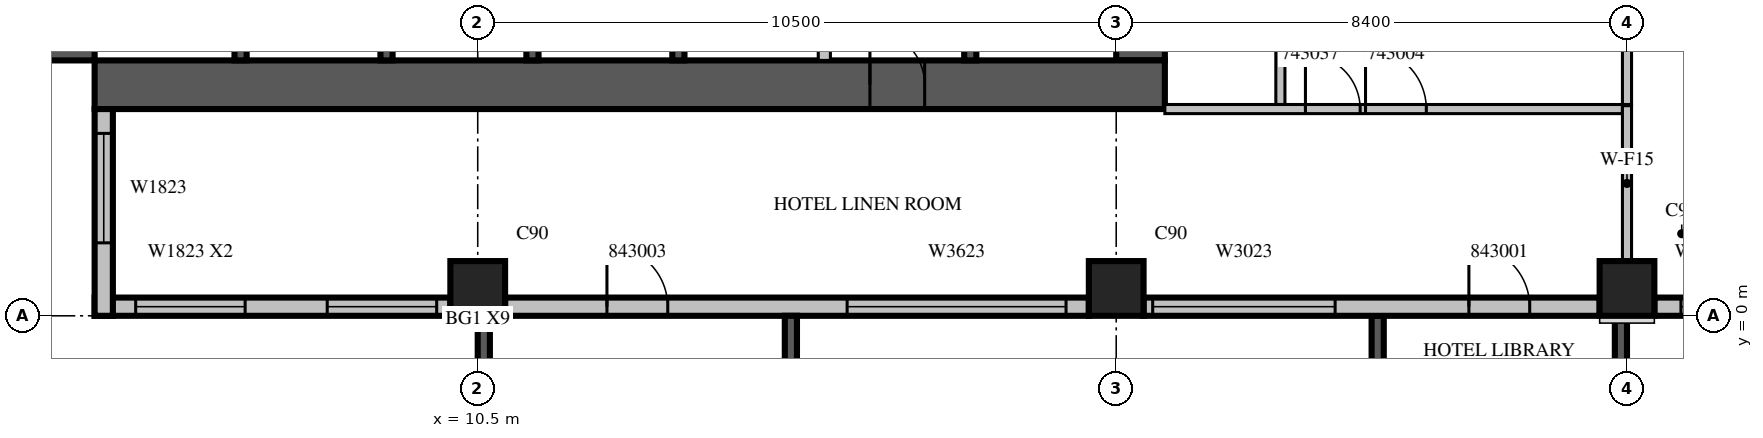
"""IFC4 building model, lengths in metres.
Left out: names, types, materials, properties, quantities, classifications, styles, units other than length and angle.
Written with IfcOpenShell. Run it as: python <this file> out.ifc"""

import sys

from ifc_helpers import new_model, si_unit, direction, frame, frame_2d, origin, origin_2d, place, context, subcontext, project, spatial, rectangle, extrude, source, transform, mapped, element, fill, save


model = new_model("IFC4")
c1 = context("Model", 3, precision=1e-05, world=origin(), true_north=direction((0.0, 1.0)))
c2 = subcontext(c1, "Body", "Model", "MODEL_VIEW")
j1 = project(units=[si_unit("LENGTHUNIT", "METRE"), si_unit("PLANEANGLEUNIT", "RADIAN")], contexts=[c1])
p1 = place(None, origin())
s1 = spatial("IfcSite", under=j1, at=p1, CompositionType="ELEMENT")
p2 = place(p1, origin())
s2 = spatial("IfcBuilding", under=s1, at=p2, CompositionType="ELEMENT")
p3 = place(p2, frame((0.0, 0.0, 196.8)))
s3 = spatial("IfcBuildingStorey", under=s2, at=p3, CompositionType="ELEMENT", Elevation=196.8)
m1 = source(origin(), c2, "Body", "SweptSolid", [
    extrude(rectangle(XDim=0.9, YDim=0.9, at=origin_2d()), origin(), (0.0, 0.0, 1.0), 3.8),
])
for number, where, z_axis, x_axis in (
    (1, (10.5, 0.45, 0.0), (0.0, 0.0, 1.0), (1.0, 0.0, 0.0)),
    (2, (21.0, 0.45, 0.0), (0.0, 0.0, 1.0), (1.0, 0.0, 0.0)),
    (3, (29.4, 0.45, 0.0), (0.0, 0.0, 1.0), (1.0, 0.0, 0.0)),
):
    element("IfcColumn", number, at=place(p3, frame(where, z_axis=z_axis, x_axis=x_axis)), inside=s3, PredefinedType="COLUMN", context=c2, shape_type="MappedRepresentation", body=[
        mapped(m1, transform((0.0, 0.0, 0.0), scale=1.0)),
    ])
m2 = source(origin(), c2, "Body", "SweptSolid", [
    extrude(rectangle(XDim=17.6, YDim=0.8, at=frame_2d((8.8, 0.0))), origin(), (0.0, 0.0, 1.0), 3.8),
])
p4 = place(p3, frame((3.8, 4.2, 0.0), z_axis=(0.0, 0.0, 1.0), x_axis=(0.0, 1.0, 0.0)))
e4 = element("IfcWall", 4, at=p4, inside=s3, PredefinedType="SHEAR", context=c2, shape_type="MappedRepresentation", body=[
    mapped(m2, transform((0.0, 0.0, 0.0), scale=1.0)),
])
m3 = source(origin(), c2, "Body", "SweptSolid", [
    extrude(rectangle(XDim=2.2, YDim=2.1, at=frame_2d((1.1, 1.05))), frame((0.0, 0.41, 0.0), z_axis=(0.0, -1.0, 0.0), x_axis=(1.0, 0.0, 0.0)), (0.0, 0.0, 1.0), 0.82),
])
p5 = place(p4, frame((4.2, 0.0, 0.0)))
e5 = element("IfcOpeningElement", 5, at=p5, cuts=e4, PredefinedType="OPENING", context=c2, shape_type="MappedRepresentation", body=[
    mapped(m3, transform((0.0, 0.0, 0.0), scale=1.0)),
])
m4 = source(origin(), c2, "Body", "SweptSolid", [
    extrude(rectangle(XDim=0.9, YDim=2.1, at=frame_2d((0.45, 1.05))), frame((0.0, 0.41, 0.0), z_axis=(0.0, -1.0, 0.0), x_axis=(1.0, 0.0, 0.0)), (0.0, 0.0, 1.0), 0.82),
])
p6 = place(p4, frame((10.95, 0.0, 0.0)))
e6 = element("IfcOpeningElement", 6, at=p6, cuts=e4, PredefinedType="OPENING", context=c2, shape_type="MappedRepresentation", body=[
    mapped(m4, transform((0.0, 0.0, 0.0), scale=1.0)),
])
m5 = source(origin(), c2, "Body", "SweptSolid", [
    extrude(rectangle(XDim=16.8, YDim=0.8, at=frame_2d((8.4, 0.0))), origin(), (0.0, 0.0, 1.0), 3.8),
])
p7 = place(p3, frame((21.4, 4.2, 0.0), z_axis=(0.0, 0.0, 1.0), x_axis=(0.0, 1.0, 0.0)))
e7 = element("IfcWall", 7, at=p7, inside=s3, PredefinedType="SHEAR", context=c2, shape_type="MappedRepresentation", body=[
    mapped(m5, transform((0.0, 0.0, 0.0), scale=1.0)),
])
p8 = place(p7, frame((4.2, 0.0, 0.0)))
e8 = element("IfcOpeningElement", 8, at=p8, cuts=e7, PredefinedType="OPENING", context=c2, shape_type="MappedRepresentation", body=[
    mapped(m3, transform((0.0, 0.0, 0.0), scale=1.0)),
])
m6 = source(origin(), c2, "Body", "SweptSolid", [
    extrude(rectangle(XDim=1.2, YDim=2.1, at=frame_2d((0.6, 1.05))), frame((0.0, 0.41, 0.0), z_axis=(0.0, -1.0, 0.0), x_axis=(1.0, 0.0, 0.0)), (0.0, 0.0, 1.0), 0.82),
])
p9 = place(p7, frame((14.7, 0.0, 0.0)))
e9 = element("IfcOpeningElement", 9, at=p9, cuts=e7, PredefinedType="OPENING", context=c2, shape_type="MappedRepresentation", body=[
    mapped(m6, transform((0.0, 0.0, 0.0), scale=1.0)),
])
p10 = place(p3, frame((4.2, 3.8, 0.0), z_axis=(0.0, 0.0, 1.0), x_axis=(1.0, 0.0, 0.0)))
e10 = element("IfcWall", 10, at=p10, inside=s3, PredefinedType="SHEAR", context=c2, shape_type="MappedRepresentation", body=[
    mapped(m2, transform((0.0, 0.0, 0.0), scale=1.0)),
])
p11 = place(p10, frame((12.75, 0.0, 0.0)))
e11 = element("IfcOpeningElement", 11, at=p11, cuts=e10, PredefinedType="OPENING", context=c2, shape_type="MappedRepresentation", body=[
    mapped(m4, transform((0.0, 0.0, 0.0), scale=1.0)),
])
m7 = source(origin(), c2, "Body", "SweptSolid", [
    extrude(rectangle(XDim=3.9, YDim=0.2, at=frame_2d((1.95, 0.0))), origin(), (0.0, 0.0, 1.0), 3.4),
])
p12 = place(p3, frame((25.3, 0.0, 0.0), z_axis=(0.0, 0.0, 1.0), x_axis=(0.0, -1.0, 0.0)))
e12 = element("IfcWall", 12, at=p12, inside=s3, PredefinedType="SOLIDWALL", context=c2, shape_type="MappedRepresentation", body=[
    mapped(m7, transform((0.0, 0.0, 0.0), scale=1.0)),
])
m8 = source(origin(), c2, "Body", "SweptSolid", [
    extrude(rectangle(XDim=2.4, YDim=2.3, at=frame_2d((1.2, 1.15))), frame((0.0, 0.11, 0.0), z_axis=(0.0, -1.0, 0.0), x_axis=(1.0, 0.0, 0.0)), (0.0, 0.0, 1.0), 0.22),
])
p13 = place(p12, frame((0.75, 0.0, 0.6)))
e13 = element("IfcOpeningElement", 13, at=p13, cuts=e12, PredefinedType="OPENING", context=c2, shape_type="MappedRepresentation", body=[
    mapped(m8, transform((0.0, 0.0, 0.0), scale=1.0)),
])
p14 = place(p3, frame((29.3, 0.0, 0.0), z_axis=(0.0, 0.0, 1.0), x_axis=(0.0, -1.0, 0.0)))
e14 = element("IfcWall", 14, at=p14, inside=s3, PredefinedType="SOLIDWALL", context=c2, shape_type="MappedRepresentation", body=[
    mapped(m7, transform((0.0, 0.0, 0.0), scale=1.0)),
])
p15 = place(p14, frame((0.75, 0.0, 0.6)))
e15 = element("IfcOpeningElement", 15, at=p15, cuts=e14, PredefinedType="OPENING", context=c2, shape_type="MappedRepresentation", body=[
    mapped(m8, transform((0.0, 0.0, 0.0), scale=1.0)),
])
m9 = source(origin(), c2, "Body", "SweptSolid", [
    extrude(rectangle(XDim=5.85, YDim=0.3, at=frame_2d((2.925, 0.0))), origin(), (0.0, 0.0, 1.0), 3.4),
])
p16 = place(p3, frame((4.2, 0.15, 0.0), z_axis=(0.0, 0.0, 1.0), x_axis=(1.0, 0.0, 0.0)))
e16 = element("IfcWall", 16, at=p16, inside=s3, PredefinedType="STANDARD", context=c2, shape_type="MappedRepresentation", body=[
    mapped(m9, transform((0.0, 0.0, 0.0), scale=1.0)),
])
m10 = source(origin(), c2, "Body", "SweptSolid", [
    extrude(rectangle(XDim=1.8, YDim=2.3, at=frame_2d((0.9, 1.15))), frame((0.0, 0.16, 0.0), z_axis=(0.0, -1.0, 0.0), x_axis=(1.0, 0.0, 0.0)), (0.0, 0.0, 1.0), 0.32),
])
p17 = place(p16, frame((0.675, 0.0, 0.6)))
e17 = element("IfcOpeningElement", 17, at=p17, cuts=e16, PredefinedType="OPENING", context=c2, shape_type="MappedRepresentation", body=[
    mapped(m10, transform((0.0, 0.0, 0.0), scale=1.0)),
])
p18 = place(p16, frame((3.825, 0.0, 0.6)))
e18 = element("IfcOpeningElement", 18, at=p18, cuts=e16, PredefinedType="OPENING", context=c2, shape_type="MappedRepresentation", body=[
    mapped(m10, transform((0.0, 0.0, 0.0), scale=1.0)),
])
m11 = source(origin(), c2, "Body", "SweptSolid", [
    extrude(rectangle(XDim=9.6, YDim=0.3, at=frame_2d((4.8, 0.0))), origin(), (0.0, 0.0, 1.0), 3.4),
])
p19 = place(p3, frame((10.95, 0.15, 0.0), z_axis=(0.0, 0.0, 1.0), x_axis=(1.0, 0.0, 0.0)))
e19 = element("IfcWall", 19, at=p19, inside=s3, PredefinedType="STANDARD", context=c2, shape_type="MappedRepresentation", body=[
    mapped(m11, transform((0.0, 0.0, 0.0), scale=1.0)),
])
m12 = source(origin(), c2, "Body", "SweptSolid", [
    extrude(rectangle(XDim=3.6, YDim=2.3, at=frame_2d((1.8, 1.15))), frame((0.0, 0.16, 0.0), z_axis=(0.0, -1.0, 0.0), x_axis=(1.0, 0.0, 0.0)), (0.0, 0.0, 1.0), 0.32),
])
p20 = place(p19, frame((5.625, 0.0, 0.6)))
e20 = element("IfcOpeningElement", 20, at=p20, cuts=e19, PredefinedType="OPENING", context=c2, shape_type="MappedRepresentation", body=[
    mapped(m12, transform((0.0, 0.0, 0.0), scale=1.0)),
])
m13 = source(origin(), c2, "Body", "SweptSolid", [
    extrude(rectangle(XDim=1.0, YDim=2.1, at=frame_2d((0.5, 1.05))), frame((0.0, 0.16, 0.0), z_axis=(0.0, -1.0, 0.0), x_axis=(1.0, 0.0, 0.0)), (0.0, 0.0, 1.0), 0.32),
])
p21 = place(p19, frame((1.675, 0.0, 0.0)))
e21 = element("IfcOpeningElement", 21, at=p21, cuts=e19, PredefinedType="OPENING", context=c2, shape_type="MappedRepresentation", body=[
    mapped(m13, transform((0.0, 0.0, 0.0), scale=1.0)),
])
m14 = source(origin(), c2, "Body", "SweptSolid", [
    extrude(rectangle(XDim=7.5, YDim=0.3, at=frame_2d((3.75, 0.0))), origin(), (0.0, 0.0, 1.0), 3.4),
])
p22 = place(p3, frame((21.45, 0.15, 0.0), z_axis=(0.0, 0.0, 1.0), x_axis=(1.0, 0.0, 0.0)))
e22 = element("IfcWall", 22, at=p22, inside=s3, PredefinedType="STANDARD", context=c2, shape_type="MappedRepresentation", body=[
    mapped(m14, transform((0.0, 0.0, 0.0), scale=1.0)),
])
m15 = source(origin(), c2, "Body", "SweptSolid", [
    extrude(rectangle(XDim=3.0, YDim=2.3, at=frame_2d((1.5, 1.15))), frame((0.0, 0.16, 0.0), z_axis=(0.0, -1.0, 0.0), x_axis=(1.0, 0.0, 0.0)), (0.0, 0.0, 1.0), 0.32),
])
p23 = place(p22, frame((0.15, 0.0, 0.6)))
e23 = element("IfcOpeningElement", 23, at=p23, cuts=e22, PredefinedType="OPENING", context=c2, shape_type="MappedRepresentation", body=[
    mapped(m15, transform((0.0, 0.0, 0.0), scale=1.0)),
])
p24 = place(p22, frame((5.35, 0.0, 0.0)))
e24 = element("IfcOpeningElement", 24, at=p24, cuts=e22, PredefinedType="OPENING", context=c2, shape_type="MappedRepresentation", body=[
    mapped(m13, transform((0.0, 0.0, 0.0), scale=1.0)),
])
p25 = place(p3, frame((29.85, 0.15, 0.0), z_axis=(0.0, 0.0, 1.0), x_axis=(1.0, 0.0, 0.0)))
e25 = element("IfcWall", 25, at=p25, inside=s3, PredefinedType="STANDARD", context=c2, shape_type="MappedRepresentation", body=[
    mapped(m14, transform((0.0, 0.0, 0.0), scale=1.0)),
])
m16 = source(origin(), c2, "Body", "SweptSolid", [
    extrude(rectangle(XDim=1.2, YDim=2.3, at=frame_2d((0.6, 1.15))), frame((0.0, 0.16, 0.0), z_axis=(0.0, -1.0, 0.0), x_axis=(1.0, 0.0, 0.0)), (0.0, 0.0, 1.0), 0.32),
])
p26 = place(p25, frame((0.438, 0.0, 0.6)))
e26 = element("IfcOpeningElement", 26, at=p26, cuts=e25, PredefinedType="OPENING", context=c2, shape_type="MappedRepresentation", body=[
    mapped(m16, transform((0.0, 0.0, 0.0), scale=1.0)),
])
p27 = place(p25, frame((5.963, 0.0, 0.6)))
e27 = element("IfcOpeningElement", 27, at=p27, cuts=e25, PredefinedType="OPENING", context=c2, shape_type="MappedRepresentation", body=[
    mapped(m16, transform((0.0, 0.0, 0.0), scale=1.0)),
])
m17 = source(origin(), c2, "Body", "SweptSolid", [
    extrude(rectangle(XDim=2.4, YDim=2.3, at=frame_2d((1.2, 1.15))), frame((0.0, 0.16, 0.0), z_axis=(0.0, -1.0, 0.0), x_axis=(1.0, 0.0, 0.0)), (0.0, 0.0, 1.0), 0.32),
])
p28 = place(p25, frame((2.6, 0.0, 0.6)))
e28 = element("IfcOpeningElement", 28, at=p28, cuts=e25, PredefinedType="OPENING", context=c2, shape_type="MappedRepresentation", body=[
    mapped(m17, transform((0.0, 0.0, 0.0), scale=1.0)),
])
m18 = source(origin(), c2, "Body", "SweptSolid", [
    extrude(rectangle(XDim=3.4, YDim=0.3, at=frame_2d((1.7, 0.0))), origin(), (0.0, 0.0, 1.0), 3.4),
])
p29 = place(p3, frame((4.35, 3.4, 0.0), z_axis=(0.0, 0.0, 1.0), x_axis=(0.0, -1.0, 0.0)))
e29 = element("IfcWall", 29, at=p29, inside=s3, PredefinedType="STANDARD", context=c2, shape_type="MappedRepresentation", body=[
    mapped(m18, transform((0.0, 0.0, 0.0), scale=1.0)),
])
p30 = place(p29, frame((0.4, 0.0, 0.6)))
e30 = element("IfcOpeningElement", 30, at=p30, cuts=e29, PredefinedType="OPENING", context=c2, shape_type="MappedRepresentation", body=[
    mapped(m10, transform((0.0, 0.0, 0.0), scale=1.0)),
])
m19 = source(origin(), c2, "Body", "SweptSolid", [
    extrude(rectangle(XDim=3.9, YDim=0.2, at=frame_2d((1.95, 0.0))), origin(), (0.0, 0.0, 1.0), 3.39),
])
p31 = place(p3, frame((10.6, 0.0, 0.0), z_axis=(0.0, 0.0, 1.0), x_axis=(0.0, -1.0, 0.0)))
e31 = element("IfcWall", 31, at=p31, inside=s3, PredefinedType="SOLIDWALL", context=c2, shape_type="MappedRepresentation", body=[
    mapped(m19, transform((0.0, 0.0, 0.0), scale=1.0)),
])
p32 = place(p31, frame((0.75, 0.0, 0.6)))
e32 = element("IfcOpeningElement", 32, at=p32, cuts=e31, PredefinedType="OPENING", context=c2, shape_type="MappedRepresentation", body=[
    mapped(m8, transform((0.0, 0.0, 0.0), scale=1.0)),
])
p33 = place(p3, frame((15.65, 0.0, 0.0), z_axis=(0.0, 0.0, 1.0), x_axis=(0.0, -1.0, 0.0)))
e33 = element("IfcWall", 33, at=p33, inside=s3, PredefinedType="SOLIDWALL", context=c2, shape_type="MappedRepresentation", body=[
    mapped(m19, transform((0.0, 0.0, 0.0), scale=1.0)),
])
p34 = place(p33, frame((0.75, 0.0, 0.6)))
e34 = element("IfcOpeningElement", 34, at=p34, cuts=e33, PredefinedType="OPENING", context=c2, shape_type="MappedRepresentation", body=[
    mapped(m8, transform((0.0, 0.0, 0.0), scale=1.0)),
])
m20 = source(origin(), c2, "Body", "SweptSolid", [
    extrude(rectangle(XDim=3.1, YDim=0.2, at=frame_2d((1.55, 0.0))), origin(), (0.0, 0.0, 1.0), 3.8),
])
for number, where, z_axis, x_axis in (
    (35, (6.6, 4.2, 0.0), (0.0, 0.0, 1.0), (0.0, 1.0, 0.0)),
    (36, (9.0, 4.2, 0.0), (0.0, 0.0, 1.0), (0.0, 1.0, 0.0)),
    (37, (11.4, 4.2, 0.0), (0.0, 0.0, 1.0), (0.0, 1.0, 0.0)),
):
    element("IfcWall", number, at=place(p3, frame(where, z_axis=z_axis, x_axis=x_axis)), inside=s3, PredefinedType="SOLIDWALL", context=c2, shape_type="MappedRepresentation", body=[
        mapped(m20, transform((0.0, 0.0, 0.0), scale=1.0)),
    ])
m21 = source(origin(), c2, "Body", "SweptSolid", [
    extrude(rectangle(XDim=3.1, YDim=0.2, at=frame_2d((1.55, 0.0))), origin(), (0.0, 0.0, 1.0), 3.4),
])
for number, where, z_axis, x_axis in (
    (38, (13.8, 4.2, 0.0), (0.0, 0.0, 1.0), (0.0, 1.0, 0.0)),
    (39, (18.6, 4.2, 0.0), (0.0, 0.0, 1.0), (0.0, 1.0, 0.0)),
):
    element("IfcWall", number, at=place(p3, frame(where, z_axis=z_axis, x_axis=x_axis)), inside=s3, PredefinedType="SOLIDWALL", context=c2, shape_type="MappedRepresentation", body=[
        mapped(m21, transform((0.0, 0.0, 0.0), scale=1.0)),
    ])
m22 = source(origin(), c2, "Body", "SweptSolid", [
    extrude(rectangle(XDim=3.1, YDim=0.2, at=frame_2d((1.55, 0.0))), origin(), (0.0, 0.0, 1.0), 3.4),
])
p35 = place(p3, frame((16.2, 4.2, 0.0), z_axis=(0.0, 0.0, 1.0), x_axis=(0.0, 1.0, 0.0)))
e40 = element("IfcWall", 40, at=p35, inside=s3, PredefinedType="PARTITIONING", context=c2, shape_type="MappedRepresentation", body=[
    mapped(m22, transform((0.0, 0.0, 0.0), scale=1.0)),
])
p36 = place(p3, frame((23.7, 14.7, 0.0), z_axis=(0.0, 0.0, 1.0), x_axis=(0.0, -1.0, 0.0)))
e41 = element("IfcWall", 41, at=p36, inside=s3, PredefinedType="PARTITIONING", context=c2, shape_type="SweptSolid", body=[
    extrude(rectangle(XDim=11.225, YDim=0.15, at=frame_2d((5.612, 0.0))), origin(), (0.0, 0.0, 1.0), 3.4),
])
m23 = source(origin(), c2, "Body", "SweptSolid", [
    extrude(rectangle(XDim=0.9, YDim=2.1, at=frame_2d((0.45, 1.05))), frame((0.0, 0.085, 0.0), z_axis=(0.0, -1.0, 0.0), x_axis=(1.0, 0.0, 0.0)), (0.0, 0.0, 1.0), 0.17),
])
p37 = place(p36, frame((8.463, 0.0, 0.0)))
e42 = element("IfcOpeningElement", 42, at=p37, cuts=e41, PredefinedType="OPENING", context=c2, shape_type="MappedRepresentation", body=[
    mapped(m23, transform((0.0, 0.0, 0.0), scale=1.0)),
])
p38 = place(p36, frame((1.975, 0.0, 0.0)))
e43 = element("IfcOpeningElement", 43, at=p38, cuts=e41, PredefinedType="OPENING", context=c2, shape_type="MappedRepresentation", body=[
    mapped(m23, transform((0.0, 0.0, 0.0), scale=1.0)),
])
m24 = source(origin(), c2, "Body", "SweptSolid", [
    extrude(rectangle(XDim=6.576, YDim=0.15, at=frame_2d((3.288, 0.0))), origin(), (0.0, 0.0, 1.0), 3.4),
])
p39 = place(p3, frame((29.4, 3.475, 0.0), z_axis=(0.0, 0.0, 1.0), x_axis=(0.0, 1.0, 0.0)))
e44 = element("IfcWall", 44, at=p39, inside=s3, PredefinedType="PARTITIONING", context=c2, shape_type="MappedRepresentation", body=[
    mapped(m24, transform((0.0, 0.0, 0.0), scale=1.0)),
])
m25 = source(origin(), c2, "Body", "SweptSolid", [
    extrude(rectangle(XDim=7.525, YDim=0.15, at=frame_2d((3.763, 0.0))), origin(), (0.0, 0.0, 1.0), 3.4),
])
p40 = place(p3, frame((21.8, 3.4, 0.0), z_axis=(0.0, 0.0, 1.0), x_axis=(1.0, 0.0, 0.0)))
e45 = element("IfcWall", 45, at=p40, inside=s3, PredefinedType="PARTITIONING", context=c2, shape_type="MappedRepresentation", body=[
    mapped(m25, transform((0.0, 0.0, 0.0), scale=1.0)),
])
m26 = source(origin(), c2, "Body", "SweptSolid", [
    extrude(rectangle(XDim=1.0, YDim=2.1, at=frame_2d((0.5, 1.05))), frame((0.0, 0.085, 0.0), z_axis=(0.0, -1.0, 0.0), x_axis=(1.0, 0.0, 0.0)), (0.0, 0.0, 1.0), 0.17),
])
p41 = place(p40, frame((3.3, 0.0, 0.0)))
e46 = element("IfcOpeningElement", 46, at=p41, cuts=e45, PredefinedType="OPENING", context=c2, shape_type="MappedRepresentation", body=[
    mapped(m26, transform((0.0, 0.0, 0.0), scale=1.0)),
])
p42 = place(p40, frame((2.312, 0.0, 0.0)))
e47 = element("IfcOpeningElement", 47, at=p42, cuts=e45, PredefinedType="OPENING", context=c2, shape_type="MappedRepresentation", body=[
    mapped(m23, transform((0.0, 0.0, 0.0), scale=1.0)),
])
m27 = source(origin(), c2, "Body", "SweptSolid", [
    extrude(rectangle(XDim=2.556, YDim=0.15, at=frame_2d((1.278, 0.0))), origin(), (0.0, 0.0, 1.0), 3.4),
])
p43 = place(p3, frame((29.4, 0.899, 0.0), z_axis=(0.0, 0.0, 1.0), x_axis=(0.0, 1.0, 0.0)))
e48 = element("IfcWall", 48, at=p43, inside=s3, PredefinedType="PARTITIONING", context=c2, shape_type="MappedRepresentation", body=[
    mapped(m27, transform((0.0, 0.0, 0.0), scale=1.0)),
])
m28 = source(origin(), c2, "Body", "SweptSolid", [
    extrude(rectangle(XDim=1.8, YDim=2.3, at=frame_2d((0.9, 1.15))), frame((0.0, 0.03, 0.0), z_axis=(0.0, -1.0, 0.0), x_axis=(1.0, 0.0, 0.0)), (0.0, 0.0, 1.0), 0.06),
])
p44 = place(p17, origin())
e49 = element("IfcWindow", 49, at=p44, inside=s3, PartitioningType="SINGLE_PANEL", PredefinedType="WINDOW", context=c2, shape_type="MappedRepresentation", body=[
    mapped(m28, transform((0.0, 0.0, 0.0), scale=1.0)),
])
fill(e17, e49)
p45 = place(p18, origin())
e50 = element("IfcWindow", 50, at=p45, inside=s3, PartitioningType="SINGLE_PANEL", PredefinedType="WINDOW", context=c2, shape_type="MappedRepresentation", body=[
    mapped(m28, transform((0.0, 0.0, 0.0), scale=1.0)),
])
fill(e18, e50)
m29 = source(origin(), c2, "Body", "SweptSolid", [
    extrude(rectangle(XDim=3.6, YDim=2.3, at=frame_2d((1.8, 1.15))), frame((0.0, 0.03, 0.0), z_axis=(0.0, -1.0, 0.0), x_axis=(1.0, 0.0, 0.0)), (0.0, 0.0, 1.0), 0.06),
])
p46 = place(p20, origin())
e51 = element("IfcWindow", 51, at=p46, inside=s3, PartitioningType="SINGLE_PANEL", PredefinedType="WINDOW", context=c2, shape_type="MappedRepresentation", body=[
    mapped(m29, transform((0.0, 0.0, 0.0), scale=1.0)),
])
fill(e20, e51)
m30 = source(origin(), c2, "Body", "SweptSolid", [
    extrude(rectangle(XDim=3.0, YDim=2.3, at=frame_2d((1.5, 1.15))), frame((0.0, 0.03, 0.0), z_axis=(0.0, -1.0, 0.0), x_axis=(1.0, 0.0, 0.0)), (0.0, 0.0, 1.0), 0.06),
])
p47 = place(p23, origin())
e52 = element("IfcWindow", 52, at=p47, inside=s3, PartitioningType="SINGLE_PANEL", PredefinedType="WINDOW", context=c2, shape_type="MappedRepresentation", body=[
    mapped(m30, transform((0.0, 0.0, 0.0), scale=1.0)),
])
fill(e23, e52)
m31 = source(origin(), c2, "Body", "SweptSolid", [
    extrude(rectangle(XDim=1.2, YDim=2.3, at=frame_2d((0.6, 1.15))), frame((0.0, 0.03, 0.0), z_axis=(0.0, -1.0, 0.0), x_axis=(1.0, 0.0, 0.0)), (0.0, 0.0, 1.0), 0.06),
])
p48 = place(p26, origin())
e53 = element("IfcWindow", 53, at=p48, inside=s3, PartitioningType="SINGLE_PANEL", PredefinedType="WINDOW", context=c2, shape_type="MappedRepresentation", body=[
    mapped(m31, transform((0.0, 0.0, 0.0), scale=1.0)),
])
fill(e26, e53)
p49 = place(p30, origin())
e54 = element("IfcWindow", 54, at=p49, inside=s3, PartitioningType="SINGLE_PANEL", PredefinedType="WINDOW", context=c2, shape_type="MappedRepresentation", body=[
    mapped(m28, transform((0.0, 0.0, 0.0), scale=1.0)),
])
fill(e30, e54)
m32 = source(origin(), c2, "Body", "SweptSolid", [
    extrude(rectangle(XDim=0.9, YDim=2.1, at=frame_2d((0.45, 1.05))), frame((0.0, 0.025, 0.0), z_axis=(0.0, -1.0, 0.0), x_axis=(1.0, 0.0, 0.0)), (0.0, 0.0, 1.0), 0.05),
])
p50 = place(p11, origin())
e55 = element("IfcDoor", 55, at=p50, inside=s3, OperationType="SINGLE_SWING_LEFT", PredefinedType="DOOR", context=c2, shape_type="MappedRepresentation", body=[
    mapped(m32, transform((0.0, 0.0, 0.0), scale=1.0)),
])
fill(e11, e55)
m33 = source(origin(), c2, "Body", "SweptSolid", [
    extrude(rectangle(XDim=1.0, YDim=2.1, at=frame_2d((0.5, 1.05))), frame((0.0, 0.025, 0.0), z_axis=(0.0, -1.0, 0.0), x_axis=(1.0, 0.0, 0.0)), (0.0, 0.0, 1.0), 0.05),
])
p51 = place(p41, origin())
e56 = element("IfcDoor", 56, at=p51, inside=s3, OperationType="SINGLE_SWING_LEFT", PredefinedType="DOOR", context=c2, shape_type="MappedRepresentation", body=[
    mapped(m33, transform((0.0, 0.0, 0.0), scale=1.0)),
])
fill(e46, e56)
p52 = place(p42, origin())
e57 = element("IfcDoor", 57, at=p52, inside=s3, OperationType="SINGLE_SWING_LEFT", PredefinedType="DOOR", context=c2, shape_type="MappedRepresentation", body=[
    mapped(m32, transform((0.0, 0.0, 0.0), scale=1.0)),
])
fill(e47, e57)
p53 = place(p24, origin())
e58 = element("IfcDoor", 58, at=p53, inside=s3, OperationType="SINGLE_SWING_LEFT", PredefinedType="DOOR", context=c2, shape_type="MappedRepresentation", body=[
    mapped(m33, transform((0.0, 0.0, 0.0), scale=1.0)),
])
fill(e24, e58)
p54 = place(p21, origin())
e59 = element("IfcDoor", 59, at=p54, inside=s3, OperationType="SINGLE_SWING_LEFT", PredefinedType="DOOR", context=c2, shape_type="MappedRepresentation", body=[
    mapped(m33, transform((0.0, 0.0, 0.0), scale=1.0)),
])
fill(e21, e59)
save(model, sys.argv[1])
